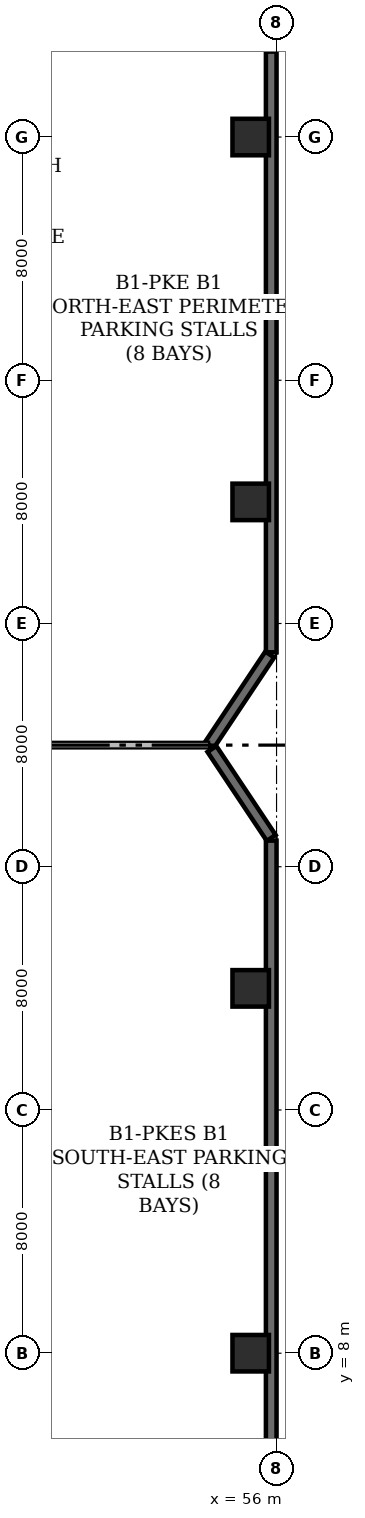
"""IFC4 building model, lengths in metres.
Left out: names, types, materials, properties, quantities, classifications, styles, units other than length and angle.
Written with IfcOpenShell. Run it as: python <this file> out.ifc"""

import sys

from ifc_helpers import new_model, si_unit, direction, frame, frame_2d, origin, origin_2d, place, context, subcontext, project, spatial, rectangle, hollow_rectangle, extrude, element, save


model = new_model("IFC4")
c1 = context("Model", 3, precision=1e-05, world=origin(), true_north=direction((0.0, 1.0)))
c2 = subcontext(c1, "Body", "Model", "MODEL_VIEW")
j1 = project(units=[si_unit("LENGTHUNIT", "METRE"), si_unit("PLANEANGLEUNIT", "RADIAN")], contexts=[c1])
p1 = place(None, origin())
s1 = spatial("IfcSite", under=j1, at=p1, CompositionType="ELEMENT")
p2 = place(p1, origin())
s2 = spatial("IfcBuilding", under=s1, at=p2, CompositionType="ELEMENT")
p3 = place(p2, frame((0.0, 0.0, -4.5)))
s3 = spatial("IfcBuildingStorey", under=s2, at=p3, CompositionType="ELEMENT", Elevation=-4.5)
for number, where, z_axis, x_axis in (
    (1, (55.15, 8.0, 0.0), (0.0, 0.0, 1.0), (1.0, 0.0, 0.0)),
    (2, (55.15, 20.0, 0.0), (0.0, 0.0, 1.0), (1.0, 0.0, 0.0)),
    (3, (55.15, 36.0, 0.0), (0.0, 0.0, 1.0), (1.0, 0.0, 0.0)),
    (4, (55.15, 48.0, 0.0), (0.0, 0.0, 1.0), (1.0, 0.0, 0.0)),
):
    element("IfcColumn", number, at=place(p3, frame(where, z_axis=z_axis, x_axis=x_axis)), inside=s3, PredefinedType="COLUMN", context=c2, shape_type="SweptSolid", body=[
        extrude(hollow_rectangle(XDim=1.2, YDim=1.2, WallThickness=0.06, at=origin_2d()), origin(), (0.0, 0.0, 1.0), 4.5),
    ])
p4 = place(p3, frame((55.825, 50.811, 0.0), z_axis=(0.0, 0.0, 1.0), x_axis=(0.0, -1.0, 0.0)))
e5 = element("IfcWall", 5, at=p4, inside=s3, PredefinedType="USERDEFINED", context=c2, shape_type="SweptSolid", body=[
    extrude(rectangle(XDim=19.758, YDim=0.35, at=frame_2d((9.879, 0.0))), origin(), (0.0, 0.0, 1.0), 4.14),
])
p5 = place(p3, frame((55.776, 30.98, 0.0), z_axis=(0.0, 0.0, 1.0), x_axis=(-0.554542857284, -0.83215516548, 0.0)))
e6 = element("IfcWall", 6, at=p5, inside=s3, PredefinedType="USERDEFINED", context=c2, shape_type="SweptSolid", body=[
    extrude(rectangle(XDim=3.581, YDim=0.35, at=frame_2d((1.791, 0.0))), origin(), (0.0, 0.0, 1.0), 4.14),
])
p6 = place(p3, frame((53.874, 27.873, 0.0), z_axis=(0.0, 0.0, 1.0), x_axis=(0.554748256429, -0.832018252197, 0.0)))
e7 = element("IfcWall", 7, at=p6, inside=s3, PredefinedType="USERDEFINED", context=c2, shape_type="SweptSolid", body=[
    extrude(rectangle(XDim=3.517, YDim=0.35, at=frame_2d((1.758, 0.0))), origin(), (0.0, 0.0, 1.0), 4.14),
])
p7 = place(p3, frame((55.825, 24.859, 0.0), z_axis=(0.0, 0.0, 1.0), x_axis=(0.0, -1.0, 0.0)))
e8 = element("IfcWall", 8, at=p7, inside=s3, PredefinedType="USERDEFINED", context=c2, shape_type="SweptSolid", body=[
    extrude(rectangle(XDim=19.787, YDim=0.35, at=frame_2d((9.894, 0.0))), origin(), (0.0, 0.0, 1.0), 4.14),
])
p8 = place(p3, frame((42.735, 28.0, 0.0), z_axis=(0.0, 0.0, 1.0), x_axis=(1.0, 0.0, 0.0)))
e9 = element("IfcWall", 9, at=p8, inside=s3, PredefinedType="STANDARD", context=c2, shape_type="SweptSolid", body=[
    extrude(rectangle(XDim=11.048, YDim=0.22, at=frame_2d((5.524, 0.0))), origin(), (0.0, 0.0, 1.0), 4.14),
])
p9 = place(p8, frame((1.8, 0.0, 0.0)))
e10 = element("IfcOpeningElement", 10, at=p9, cuts=e9, PredefinedType="OPENING", context=c2, shape_type="SweptSolid", body=[
    extrude(rectangle(XDim=3.2, YDim=2.7, at=frame_2d((1.6, 1.35))), frame((0.0, 0.12, 0.0), z_axis=(0.0, -1.0, 0.0), x_axis=(1.0, 0.0, 0.0)), (0.0, 0.0, 1.0), 0.24),
])
save(model, sys.argv[1])
